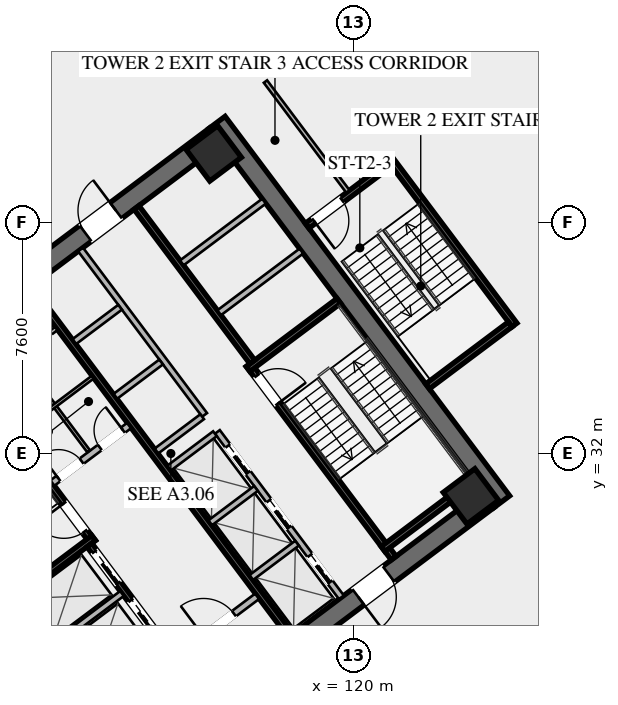
"""IFC4 building model, lengths in metres.
Left out: names, types, materials, properties, quantities, classifications, styles, units other than length and angle.
Written with IfcOpenShell. Run it as: python <this file> out.ifc"""

import sys

from ifc_helpers import new_model, si_unit, direction, frame, frame_2d, origin, origin_2d, place, context, subcontext, project, spatial, rectangle, hollow_rectangle, extrude, element, fill, save


model = new_model("IFC4")
c1 = context("Model", 3, precision=1e-05, world=origin(), true_north=direction((0.0, 1.0)))
c2 = subcontext(c1, "Body", "Model", "MODEL_VIEW")
j1 = project(units=[si_unit("LENGTHUNIT", "METRE"), si_unit("PLANEANGLEUNIT", "RADIAN")], contexts=[c1])
p1 = place(None, origin())
s1 = spatial("IfcSite", under=j1, at=p1, CompositionType="ELEMENT")
p2 = place(p1, origin())
s2 = spatial("IfcBuilding", under=s1, at=p2, CompositionType="ELEMENT")
p3 = place(p2, frame((0.0, 0.0, 15.6)))
s3 = spatial("IfcBuildingStorey", under=s2, at=p3, CompositionType="ELEMENT", Elevation=15.6)
for number, where, z_axis, x_axis in (
    (1, (112.476, 21.107, 0.0), (0.0, 0.0, 1.0), (-0.6, 0.8, 0.0)),
    (2, (115.524, 42.893, 0.0), (0.0, 0.0, 1.0), (0.6, -0.8, 0.0)),
):
    element("IfcWall", number, at=place(p3, frame(where, z_axis=z_axis, x_axis=x_axis)), inside=s3, PredefinedType="SHEAR", context=c2, shape_type="SweptSolid", body=[
        extrude(rectangle(XDim=15.6, YDim=0.65, at=frame_2d((7.8, 0.0))), origin(), (0.0, 0.0, 1.0), 4.2),
    ])
p4 = place(p3, frame((124.429, 30.478, 0.0), z_axis=(0.0, 0.0, 1.0), x_axis=(-0.799998028465, -0.600002628705, 0.0)))
e3 = element("IfcWall", 3, at=p4, inside=s3, PredefinedType="SHEAR", context=c2, shape_type="SweptSolid", body=[
    extrude(rectangle(XDim=14.86, YDim=0.65, at=frame_2d((7.43, 0.0))), origin(), (0.0, 0.0, 1.0), 4.2),
])
p5 = place(p4, frame((9.13, 0.0, 0.0)))
e4 = element("IfcOpeningElement", 4, at=p5, cuts=e3, PredefinedType="OPENING", context=c2, shape_type="SweptSolid", body=[
    extrude(rectangle(XDim=1.25, YDim=2.25, at=frame_2d((0.625, 1.125))), frame((0.0, 0.335, 0.0), z_axis=(0.0, -1.0, 0.0), x_axis=(1.0, 0.0, 0.0)), (0.0, 0.0, 1.0), 0.67),
])
p6 = place(p4, frame((4.08, 0.0, 0.0)))
e5 = element("IfcOpeningElement", 5, at=p6, cuts=e3, PredefinedType="OPENING", context=c2, shape_type="SweptSolid", body=[
    extrude(rectangle(XDim=1.25, YDim=2.25, at=frame_2d((0.625, 1.125))), frame((0.0, 0.335, 0.0), z_axis=(0.0, -1.0, 0.0), x_axis=(1.0, 0.0, 0.0)), (0.0, 0.0, 1.0), 0.67),
])
p7 = place(p3, frame((103.571, 33.522, 0.0), z_axis=(0.0, 0.0, 1.0), x_axis=(0.799998028465, 0.600002628705, 0.0)))
e6 = element("IfcWall", 6, at=p7, inside=s3, PredefinedType="SHEAR", context=c2, shape_type="SweptSolid", body=[
    extrude(rectangle(XDim=14.86, YDim=0.65, at=frame_2d((7.43, 0.0))), origin(), (0.0, 0.0, 1.0), 4.2),
])
p8 = place(p7, frame((4.48, 0.0, 0.0)))
e7 = element("IfcOpeningElement", 7, at=p8, cuts=e6, PredefinedType="OPENING", context=c2, shape_type="SweptSolid", body=[
    extrude(rectangle(XDim=1.25, YDim=2.25, at=frame_2d((0.625, 1.125))), frame((0.0, 0.335, 0.0), z_axis=(0.0, -1.0, 0.0), x_axis=(1.0, 0.0, 0.0)), (0.0, 0.0, 1.0), 0.67),
])
p9 = place(p7, frame((9.53, 0.0, 0.0)))
e8 = element("IfcOpeningElement", 8, at=p9, cuts=e6, PredefinedType="OPENING", context=c2, shape_type="SweptSolid", body=[
    extrude(rectangle(XDim=1.25, YDim=2.25, at=frame_2d((0.625, 1.125))), frame((0.0, 0.335, 0.0), z_axis=(0.0, -1.0, 0.0), x_axis=(1.0, 0.0, 0.0)), (0.0, 0.0, 1.0), 0.67),
])
for number, where, z_axis, x_axis in (
    (9, (123.87, 30.59, 0.0), (0.0, 0.0, 1.0), (0.8, 0.6, 0.0)),
    (10, (115.41, 41.87, 0.0), (0.0, 0.0, 1.0), (0.8, 0.6, 0.0)),
):
    element("IfcColumn", number, at=place(p3, frame(where, z_axis=z_axis, x_axis=x_axis)), inside=s3, PredefinedType="COLUMN", context=c2, shape_type="SweptSolid", body=[
        extrude(hollow_rectangle(XDim=1.3, YDim=1.3, WallThickness=0.05, at=origin_2d()), origin(), (0.0, 0.0, 1.0), 3.9),
    ])
p10 = place(p3, frame((111.44, 29.08, 0.0), z_axis=(0.0, 0.0, 1.0), x_axis=(-0.600009827119, 0.799992629566, 0.0)))
e11 = element("IfcWall", 11, at=p10, inside=s3, PredefinedType="SHEAR", context=c2, shape_type="SweptSolid", body=[
    extrude(rectangle(XDim=7.95, YDim=0.2, at=frame_2d((3.975, 0.0))), origin(), (0.0, 0.0, 1.0), 3.9),
])
p11 = place(p10, frame((0.45, 0.0, 0.0)))
e12 = element("IfcOpeningElement", 12, at=p11, cuts=e11, PredefinedType="OPENING", context=c2, shape_type="SweptSolid", body=[
    extrude(rectangle(XDim=1.15, YDim=2.2, at=frame_2d((0.575, 1.1))), frame((0.0, 0.11, 0.0), z_axis=(0.0, -1.0, 0.0), x_axis=(1.0, 0.0, 0.0)), (0.0, 0.0, 1.0), 0.22),
])
p12 = place(p3, frame((108.476, 26.982, 0.0), z_axis=(0.0, 0.0, 1.0), x_axis=(0.799984290658, 0.600020945218, 0.0)))
e13 = element("IfcWall", 13, at=p12, inside=s3, PredefinedType="SHEAR", context=c2, shape_type="SweptSolid", body=[
    extrude(rectangle(XDim=3.73, YDim=0.2, at=frame_2d((1.865, 0.0))), origin(), (0.0, 0.0, 1.0), 3.9),
])
p13 = place(p3, frame((116.56, 34.92, 0.0), z_axis=(0.0, 0.0, 1.0), x_axis=(0.600009827119, -0.799992629566, 0.0)))
e14 = element("IfcWall", 14, at=p13, inside=s3, PredefinedType="SHEAR", context=c2, shape_type="SweptSolid", body=[
    extrude(rectangle(XDim=7.95, YDim=0.2, at=frame_2d((3.975, 0.0))), origin(), (0.0, 0.0, 1.0), 3.9),
])
p14 = place(p13, frame((0.45, 0.0, 0.0)))
e15 = element("IfcOpeningElement", 15, at=p14, cuts=e14, PredefinedType="OPENING", context=c2, shape_type="SweptSolid", body=[
    extrude(rectangle(XDim=1.15, YDim=2.2, at=frame_2d((0.575, 1.1))), frame((0.0, 0.11, 0.0), z_axis=(0.0, -1.0, 0.0), x_axis=(1.0, 0.0, 0.0)), (0.0, 0.0, 1.0), 0.22),
])
for number, where, z_axis, x_axis in (
    (16, (116.54, 34.78, 0.0), (0.0, 0.0, 1.0), (0.8, 0.6, 0.0)),
    (17, (120.98, 28.86, 0.0), (0.0, 0.0, 1.0), (0.8, 0.6, 0.0)),
):
    element("IfcWall", number, at=place(p3, frame(where, z_axis=z_axis, x_axis=x_axis)), inside=s3, PredefinedType="SHEAR", context=c2, shape_type="SweptSolid", body=[
        extrude(rectangle(XDim=3.73, YDim=0.2, at=frame_2d((1.865, 0.0))), origin(), (0.0, 0.0, 1.0), 3.9),
    ])
p15 = place(p3, frame((117.938, 26.016, 0.0), z_axis=(0.0, 0.0, 1.0), x_axis=(-0.600005463273, 0.799995902516, 0.0)))
e18 = element("IfcWall", 18, at=p15, inside=s3, PredefinedType="SHEAR", context=c2, shape_type="SweptSolid", body=[
    extrude(rectangle(XDim=14.3, YDim=0.2, at=frame_2d((7.15, 0.0))), origin(), (0.0, 0.0, 1.0), 3.9),
])
p16 = place(p3, frame((110.104, 31.028, 0.0), z_axis=(0.0, 0.0, 1.0), x_axis=(0.800018601094, 0.59997519774, 0.0)))
e19 = element("IfcWall", 19, at=p16, inside=s3, PredefinedType="SOLIDWALL", context=c2, shape_type="SweptSolid", body=[
    extrude(rectangle(XDim=3.15, YDim=0.22, at=frame_2d((1.575, 0.0))), origin(), (0.0, 0.0, 1.0), 2.943),
])
p17 = place(p16, frame((0.25, 0.0, 0.0)))
e20 = element("IfcOpeningElement", 20, at=p17, cuts=e19, PredefinedType="OPENING", context=c2, shape_type="SweptSolid", body=[
    extrude(rectangle(XDim=0.95, YDim=2.05, at=frame_2d((0.475, 1.025))), frame((0.0, 0.12, 0.0), z_axis=(0.0, -1.0, 0.0), x_axis=(1.0, 0.0, 0.0)), (0.0, 0.0, 1.0), 0.24),
])
p18 = place(p16, frame((1.95, 0.0, 0.0)))
e21 = element("IfcOpeningElement", 21, at=p18, cuts=e19, PredefinedType="OPENING", context=c2, shape_type="SweptSolid", body=[
    extrude(rectangle(XDim=0.95, YDim=2.05, at=frame_2d((0.475, 1.025))), frame((0.0, 0.12, 0.0), z_axis=(0.0, -1.0, 0.0), x_axis=(1.0, 0.0, 0.0)), (0.0, 0.0, 1.0), 0.24),
])
p19 = place(p3, frame((114.316, 25.412, 0.0), z_axis=(0.0, 0.0, 1.0), x_axis=(0.800018601094, 0.59997519774, 0.0)))
e22 = element("IfcWall", 22, at=p19, inside=s3, PredefinedType="SOLIDWALL", context=c2, shape_type="SweptSolid", body=[
    extrude(rectangle(XDim=3.15, YDim=0.22, at=frame_2d((1.575, 0.0))), origin(), (0.0, 0.0, 1.0), 2.943),
])
p20 = place(p19, frame((0.95, 0.0, 0.0)))
e23 = element("IfcOpeningElement", 23, at=p20, cuts=e22, PredefinedType="OPENING", context=c2, shape_type="SweptSolid", body=[
    extrude(rectangle(XDim=1.25, YDim=2.25, at=frame_2d((0.625, 1.125))), frame((0.0, 0.12, 0.0), z_axis=(0.0, -1.0, 0.0), x_axis=(1.0, 0.0, 0.0)), (0.0, 0.0, 1.0), 0.24),
])
p21 = place(p3, frame((115.13, 23.91, 0.0), z_axis=(0.0, 0.0, 1.0), x_axis=(-0.599975393228, 0.800018454488, 0.0)))
e24 = element("IfcWall", 24, at=p21, inside=s3, PredefinedType="SHEAR", context=c2, shape_type="SweptSolid", body=[
    extrude(rectangle(XDim=6.35, YDim=0.2, at=frame_2d((3.175, 0.0))), origin(), (0.0, 0.0, 1.0), 3.9),
])
p22 = place(p21, frame((4.775, 0.0, 0.0)))
e25 = element("IfcOpeningElement", 25, at=p22, cuts=e24, PredefinedType="OPENING", context=c2, shape_type="SweptSolid", body=[
    extrude(rectangle(XDim=1.3, YDim=2.25, at=frame_2d((0.65, 1.125))), frame((0.0, 0.11, 0.0), z_axis=(0.0, -1.0, 0.0), x_axis=(1.0, 0.0, 0.0)), (0.0, 0.0, 1.0), 0.22),
])
p23 = place(p21, frame((2.775, 0.0, 0.0)))
e26 = element("IfcOpeningElement", 26, at=p23, cuts=e24, PredefinedType="OPENING", context=c2, shape_type="SweptSolid", body=[
    extrude(rectangle(XDim=1.3, YDim=2.25, at=frame_2d((0.65, 1.125))), frame((0.0, 0.11, 0.0), z_axis=(0.0, -1.0, 0.0), x_axis=(1.0, 0.0, 0.0)), (0.0, 0.0, 1.0), 0.22),
])
p24 = place(p21, frame((0.575, 0.0, 0.0)))
e27 = element("IfcOpeningElement", 27, at=p24, cuts=e24, PredefinedType="OPENING", context=c2, shape_type="SweptSolid", body=[
    extrude(rectangle(XDim=1.3, YDim=2.25, at=frame_2d((0.65, 1.125))), frame((0.0, 0.11, 0.0), z_axis=(0.0, -1.0, 0.0), x_axis=(1.0, 0.0, 0.0)), (0.0, 0.0, 1.0), 0.22),
])
p25 = place(p3, frame((109.688, 25.366, 0.0), z_axis=(0.0, 0.0, 1.0), x_axis=(0.8, 0.6, 0.0)))
e28 = element("IfcWall", 28, at=p25, inside=s3, PredefinedType="SOLIDWALL", context=c2, shape_type="SweptSolid", body=[
    extrude(rectangle(XDim=3.38, YDim=0.2, at=frame_2d((1.69, 0.0))), origin(), (0.0, 0.0, 1.0), 3.9),
])
p26 = place(p3, frame((112.87, 40.09, 0.0), z_axis=(0.0, 0.0, 1.0), x_axis=(0.599975393228, -0.800018454488, 0.0)))
e29 = element("IfcWall", 29, at=p26, inside=s3, PredefinedType="SHEAR", context=c2, shape_type="SweptSolid", body=[
    extrude(rectangle(XDim=6.35, YDim=0.2, at=frame_2d((3.175, 0.0))), origin(), (0.0, 0.0, 1.0), 3.9),
])
for number, where, z_axis, x_axis in (
    (30, (115.59, 36.63, 0.0), (0.0, 0.0, 1.0), (0.8, 0.6, 0.0)),
    (31, (114.36, 38.27, 0.0), (0.0, 0.0, 1.0), (0.8, 0.6, 0.0)),
):
    element("IfcWall", number, at=place(p3, frame(where, z_axis=z_axis, x_axis=x_axis)), inside=s3, PredefinedType="SOLIDWALL", context=c2, shape_type="SweptSolid", body=[
        extrude(rectangle(XDim=3.38, YDim=0.2, at=frame_2d((1.69, 0.0))), origin(), (0.0, 0.0, 1.0), 3.9),
    ])
p27 = place(p3, frame((107.71, 34.22, 0.0), z_axis=(0.0, 0.0, 1.0), x_axis=(0.799981399002, 0.60002480053, 0.0)))
e32 = element("IfcWall", 32, at=p27, inside=s3, PredefinedType="PARTITIONING", context=c2, shape_type="SweptSolid", body=[
    extrude(rectangle(XDim=3.15, YDim=0.135, at=frame_2d((1.575, 0.0))), origin(), (0.0, 0.0, 1.0), 2.943),
])
p28 = place(p27, frame((0.25, 0.0, 0.0)))
e33 = element("IfcOpeningElement", 33, at=p28, cuts=e32, PredefinedType="OPENING", context=c2, shape_type="SweptSolid", body=[
    extrude(rectangle(XDim=0.95, YDim=2.05, at=frame_2d((0.475, 1.025))), frame((0.0, 0.077, 0.0), z_axis=(0.0, -1.0, 0.0), x_axis=(1.0, 0.0, 0.0)), (0.0, 0.0, 1.0), 0.155),
])
p29 = place(p27, frame((1.95, 0.0, 0.0)))
e34 = element("IfcOpeningElement", 34, at=p29, cuts=e32, PredefinedType="OPENING", context=c2, shape_type="SweptSolid", body=[
    extrude(rectangle(XDim=0.95, YDim=2.05, at=frame_2d((0.475, 1.025))), frame((0.0, 0.077, 0.0), z_axis=(0.0, -1.0, 0.0), x_axis=(1.0, 0.0, 0.0)), (0.0, 0.0, 1.0), 0.155),
])
p30 = place(p3, frame((111.296, 32.072, 0.0), z_axis=(0.0, 0.0, 1.0), x_axis=(-0.59995887973, 0.800030838552, 0.0)))
e35 = element("IfcWall", 35, at=p30, inside=s3, PredefinedType="PARTITIONING", context=c2, shape_type="SweptSolid", body=[
    extrude(rectangle(XDim=3.8, YDim=0.11, at=frame_2d((1.9, 0.0))), origin(), (0.0, 0.0, 1.0), 2.943),
])
p31 = place(p3, frame((108.91, 32.62, 0.0), z_axis=(0.0, 0.0, 1.0), x_axis=(0.800018601094, 0.59997519774, 0.0)))
e36 = element("IfcWall", 36, at=p31, inside=s3, PredefinedType="PARTITIONING", context=c2, shape_type="SweptSolid", body=[
    extrude(rectangle(XDim=3.15, YDim=0.11, at=frame_2d((1.575, 0.0))), origin(), (0.0, 0.0, 1.0), 2.943),
])
p32 = place(p3, frame((119.61, 27.27, 0.0), z_axis=(0.0, 0.0, 1.0), x_axis=(-0.600011488909, 0.79999138319, 0.0)))
e37 = element("IfcWall", 37, at=p32, inside=s3, PredefinedType="SOLIDWALL", context=c2, shape_type="SweptSolid", body=[
    extrude(rectangle(XDim=6.8, YDim=0.2, at=frame_2d((3.4, 0.0))), origin(), (0.0, 0.0, 1.0), 3.9),
])
p33 = place(p32, frame((0.625, 0.0, 0.0)))
e38 = element("IfcOpeningElement", 38, at=p33, cuts=e37, PredefinedType="OPENING", context=c2, shape_type="SweptSolid", body=[
    extrude(rectangle(XDim=1.1, YDim=2.2, at=frame_2d((0.55, 1.1))), frame((0.0, 0.11, 0.0), z_axis=(0.0, -1.0, 0.0), x_axis=(1.0, 0.0, 0.0)), (0.0, 0.0, 1.0), 0.22),
])
p34 = place(p32, frame((2.875, 0.0, 0.0)))
e39 = element("IfcOpeningElement", 39, at=p34, cuts=e37, PredefinedType="OPENING", context=c2, shape_type="SweptSolid", body=[
    extrude(rectangle(XDim=1.1, YDim=2.2, at=frame_2d((0.55, 1.1))), frame((0.0, 0.11, 0.0), z_axis=(0.0, -1.0, 0.0), x_axis=(1.0, 0.0, 0.0)), (0.0, 0.0, 1.0), 0.22),
])
p35 = place(p32, frame((5.125, 0.0, 0.0)))
e40 = element("IfcOpeningElement", 40, at=p35, cuts=e37, PredefinedType="OPENING", context=c2, shape_type="SweptSolid", body=[
    extrude(rectangle(XDim=1.1, YDim=2.2, at=frame_2d((0.55, 1.1))), frame((0.0, 0.11, 0.0), z_axis=(0.0, -1.0, 0.0), x_axis=(1.0, 0.0, 0.0)), (0.0, 0.0, 1.0), 0.22),
])
p36 = place(p3, frame((116.646, 27.922, 0.0), z_axis=(0.0, 0.0, 1.0), x_axis=(0.8, 0.6, 0.0)))
e41 = element("IfcWall", 41, at=p36, inside=s3, PredefinedType="SOLIDWALL", context=c2, shape_type="SweptSolid", body=[
    extrude(rectangle(XDim=1.88, YDim=0.2, at=frame_2d((0.94, 0.0))), origin(), (0.0, 0.0, 1.0), 3.9),
])
p37 = place(p3, frame((115.296, 29.722, 0.0), z_axis=(0.0, 0.0, 1.0), x_axis=(0.799984418148, 0.600020775241, 0.0)))
e42 = element("IfcWall", 42, at=p37, inside=s3, PredefinedType="SOLIDWALL", context=c2, shape_type="SweptSolid", body=[
    extrude(rectangle(XDim=1.88, YDim=0.2, at=frame_2d((0.94, 0.0))), origin(), (0.0, 0.0, 1.0), 3.9),
])
p38 = place(p3, frame((113.946, 31.522, 0.0), z_axis=(0.0, 0.0, 1.0), x_axis=(0.8, 0.6, 0.0)))
e43 = element("IfcWall", 43, at=p38, inside=s3, PredefinedType="SOLIDWALL", context=c2, shape_type="SweptSolid", body=[
    extrude(rectangle(XDim=1.88, YDim=0.2, at=frame_2d((0.94, 0.0))), origin(), (0.0, 0.0, 1.0), 3.9),
])
p39 = place(p3, frame((115.11, 33.27, 0.0), z_axis=(0.0, 0.0, 1.0), x_axis=(-0.600011488909, 0.79999138319, 0.0)))
e44 = element("IfcWall", 44, at=p39, inside=s3, PredefinedType="SOLIDWALL", context=c2, shape_type="SweptSolid", body=[
    extrude(rectangle(XDim=6.8, YDim=0.2, at=frame_2d((3.4, 0.0))), origin(), (0.0, 0.0, 1.0), 3.9),
])
p40 = place(p3, frame((113.526, 32.082, 0.0), z_axis=(0.0, 0.0, 1.0), x_axis=(0.800046745961, 0.599937666993, 0.0)))
e45 = element("IfcWall", 45, at=p40, inside=s3, PredefinedType="SOLIDWALL", context=c2, shape_type="SweptSolid", body=[
    extrude(rectangle(XDim=1.88, YDim=0.2, at=frame_2d((0.94, 0.0))), origin(), (0.0, 0.0, 1.0), 3.9),
])
p41 = place(p3, frame((112.176, 33.882, 0.0), z_axis=(0.0, 0.0, 1.0), x_axis=(0.8, 0.6, 0.0)))
e46 = element("IfcWall", 46, at=p41, inside=s3, PredefinedType="SOLIDWALL", context=c2, shape_type="SweptSolid", body=[
    extrude(rectangle(XDim=1.88, YDim=0.2, at=frame_2d((0.94, 0.0))), origin(), (0.0, 0.0, 1.0), 3.9),
])
p42 = place(p3, frame((110.826, 35.682, 0.0), z_axis=(0.0, 0.0, 1.0), x_axis=(0.799984418148, 0.600020775241, 0.0)))
e47 = element("IfcWall", 47, at=p42, inside=s3, PredefinedType="SOLIDWALL", context=c2, shape_type="SweptSolid", body=[
    extrude(rectangle(XDim=1.88, YDim=0.2, at=frame_2d((0.94, 0.0))), origin(), (0.0, 0.0, 1.0), 3.9),
])
p43 = place(p3, frame((125.304, 36.228, 0.0), z_axis=(0.0, 0.0, 1.0), x_axis=(-0.59998851072, 0.800008616831, 0.0)))
e48 = element("IfcWall", 48, at=p43, inside=s3, PredefinedType="SHEAR", context=c2, shape_type="SweptSolid", body=[
    extrude(rectangle(XDim=6.8, YDim=0.2, at=frame_2d((3.4, 0.0))), origin(), (0.0, 0.0, 1.0), 3.9),
])
p44 = place(p3, frame((121.204, 41.528, 0.0), z_axis=(0.0, 0.0, 1.0), x_axis=(-0.800017232136, -0.599977023131, 0.0)))
e49 = element("IfcWall", 49, at=p44, inside=s3, PredefinedType="SHEAR", context=c2, shape_type="SweptSolid", body=[
    extrude(rectangle(XDim=3.4, YDim=0.2, at=frame_2d((1.7, 0.0))), origin(), (0.0, 0.0, 1.0), 3.9),
])
p45 = place(p44, frame((1.975, 0.0, 0.0)))
e50 = element("IfcOpeningElement", 50, at=p45, cuts=e49, PredefinedType="OPENING", context=c2, shape_type="SweptSolid", body=[
    extrude(rectangle(XDim=1.15, YDim=2.2, at=frame_2d((0.575, 1.1))), frame((0.0, 0.11, 0.0), z_axis=(0.0, -1.0, 0.0), x_axis=(1.0, 0.0, 0.0)), (0.0, 0.0, 1.0), 0.22),
])
p46 = place(p3, frame((122.444, 34.208, 0.0), z_axis=(0.0, 0.0, 1.0), x_axis=(0.79999138319, 0.600011488909, 0.0)))
e51 = element("IfcWall", 51, at=p46, inside=s3, PredefinedType="SHEAR", context=c2, shape_type="SweptSolid", body=[
    extrude(rectangle(XDim=3.4, YDim=0.2, at=frame_2d((1.7, 0.0))), origin(), (0.0, 0.0, 1.0), 3.9),
])
p47 = place(p3, frame((119.824, 40.618, 0.0), z_axis=(0.0, 0.0, 1.0), x_axis=(-0.59999135767, 0.800006481675, 0.0)))
e52 = element("IfcWall", 52, at=p47, inside=s3, PredefinedType="PARTITIONING", context=c2, shape_type="SweptSolid", body=[
    extrude(rectangle(XDim=4.52, YDim=0.135, at=frame_2d((2.26, 0.0))), origin(), (0.0, 0.0, 1.0), 2.943),
])
p48 = place(p9, origin())
e53 = element("IfcDoor", 53, at=p48, inside=s3, OperationType="SINGLE_SWING_RIGHT", PredefinedType="DOOR", context=c2, shape_type="SweptSolid", body=[
    extrude(rectangle(XDim=1.25, YDim=2.25, at=frame_2d((0.625, 1.125))), frame((0.0, 0.025, 0.0), z_axis=(0.0, -1.0, 0.0), x_axis=(1.0, 0.0, 0.0)), (0.0, 0.0, 1.0), 0.05),
])
fill(e8, e53)
p49 = place(p6, origin())
e54 = element("IfcDoor", 54, at=p49, inside=s3, OperationType="SINGLE_SWING_RIGHT", PredefinedType="DOOR", context=c2, shape_type="SweptSolid", body=[
    extrude(rectangle(XDim=1.25, YDim=2.25, at=frame_2d((0.625, 1.125))), frame((0.0, 0.025, 0.0), z_axis=(0.0, -1.0, 0.0), x_axis=(1.0, 0.0, 0.0)), (0.0, 0.0, 1.0), 0.05),
])
fill(e5, e54)
p50 = place(p11, origin())
e55 = element("IfcDoor", 55, at=p50, inside=s3, OperationType="SINGLE_SWING_RIGHT", PredefinedType="DOOR", context=c2, shape_type="SweptSolid", body=[
    extrude(rectangle(XDim=1.15, YDim=2.2, at=frame_2d((0.575, 1.1))), frame((0.0, 0.025, 0.0), z_axis=(0.0, -1.0, 0.0), x_axis=(1.0, 0.0, 0.0)), (0.0, 0.0, 1.0), 0.05),
])
fill(e12, e55)
p51 = place(p14, origin())
e56 = element("IfcDoor", 56, at=p51, inside=s3, OperationType="SINGLE_SWING_RIGHT", PredefinedType="DOOR", context=c2, shape_type="SweptSolid", body=[
    extrude(rectangle(XDim=1.15, YDim=2.2, at=frame_2d((0.575, 1.1))), frame((0.0, 0.025, 0.0), z_axis=(0.0, -1.0, 0.0), x_axis=(1.0, 0.0, 0.0)), (0.0, 0.0, 1.0), 0.05),
])
fill(e15, e56)
p52 = place(p20, origin())
e57 = element("IfcDoor", 57, at=p52, inside=s3, OperationType="SINGLE_SWING_LEFT", PredefinedType="DOOR", context=c2, shape_type="SweptSolid", body=[
    extrude(rectangle(XDim=1.25, YDim=2.25, at=frame_2d((0.625, 1.125))), frame((0.0, 0.025, 0.0), z_axis=(0.0, -1.0, 0.0), x_axis=(1.0, 0.0, 0.0)), (0.0, 0.0, 1.0), 0.05),
])
fill(e23, e57)
p53 = place(p17, origin())
e58 = element("IfcDoor", 58, at=p53, inside=s3, OperationType="SINGLE_SWING_LEFT", PredefinedType="DOOR", context=c2, shape_type="SweptSolid", body=[
    extrude(rectangle(XDim=0.95, YDim=2.05, at=frame_2d((0.475, 1.025))), frame((0.0, 0.025, 0.0), z_axis=(0.0, -1.0, 0.0), x_axis=(1.0, 0.0, 0.0)), (0.0, 0.0, 1.0), 0.05),
])
fill(e20, e58)
p54 = place(p18, origin())
e59 = element("IfcDoor", 59, at=p54, inside=s3, OperationType="SINGLE_SWING_RIGHT", PredefinedType="DOOR", context=c2, shape_type="SweptSolid", body=[
    extrude(rectangle(XDim=0.95, YDim=2.05, at=frame_2d((0.475, 1.025))), frame((0.0, 0.025, 0.0), z_axis=(0.0, -1.0, 0.0), x_axis=(1.0, 0.0, 0.0)), (0.0, 0.0, 1.0), 0.05),
])
fill(e21, e59)
p55 = place(p45, origin())
e60 = element("IfcDoor", 60, at=p55, inside=s3, OperationType="SINGLE_SWING_RIGHT", PredefinedType="DOOR", context=c2, shape_type="SweptSolid", body=[
    extrude(rectangle(XDim=1.15, YDim=2.2, at=frame_2d((0.575, 1.1))), frame((0.0, 0.025, 0.0), z_axis=(0.0, -1.0, 0.0), x_axis=(1.0, 0.0, 0.0)), (0.0, 0.0, 1.0), 0.05),
])
fill(e50, e60)
p56 = place(p22, origin())
e61 = element("IfcDoor", 61, at=p56, inside=s3, OperationType="SLIDING_TO_LEFT", PredefinedType="DOOR", context=c2, shape_type="SweptSolid", body=[
    extrude(rectangle(XDim=1.3, YDim=2.25, at=frame_2d((0.65, 1.125))), frame((0.0, 0.025, 0.0), z_axis=(0.0, -1.0, 0.0), x_axis=(1.0, 0.0, 0.0)), (0.0, 0.0, 1.0), 0.05),
])
fill(e25, e61)
p57 = place(p23, origin())
e62 = element("IfcDoor", 62, at=p57, inside=s3, OperationType="SLIDING_TO_LEFT", PredefinedType="DOOR", context=c2, shape_type="SweptSolid", body=[
    extrude(rectangle(XDim=1.3, YDim=2.25, at=frame_2d((0.65, 1.125))), frame((0.0, 0.025, 0.0), z_axis=(0.0, -1.0, 0.0), x_axis=(1.0, 0.0, 0.0)), (0.0, 0.0, 1.0), 0.05),
])
fill(e26, e62)
p58 = place(p33, origin())
e63 = element("IfcDoor", 63, at=p58, inside=s3, OperationType="SLIDING_TO_LEFT", PredefinedType="DOOR", context=c2, shape_type="SweptSolid", body=[
    extrude(rectangle(XDim=1.1, YDim=2.2, at=frame_2d((0.55, 1.1))), frame((0.0, 0.025, 0.0), z_axis=(0.0, -1.0, 0.0), x_axis=(1.0, 0.0, 0.0)), (0.0, 0.0, 1.0), 0.05),
])
fill(e38, e63)
p59 = place(p34, origin())
e64 = element("IfcDoor", 64, at=p59, inside=s3, OperationType="SLIDING_TO_LEFT", PredefinedType="DOOR", context=c2, shape_type="SweptSolid", body=[
    extrude(rectangle(XDim=1.1, YDim=2.2, at=frame_2d((0.55, 1.1))), frame((0.0, 0.025, 0.0), z_axis=(0.0, -1.0, 0.0), x_axis=(1.0, 0.0, 0.0)), (0.0, 0.0, 1.0), 0.05),
])
fill(e39, e64)
p60 = place(p35, origin())
e65 = element("IfcDoor", 65, at=p60, inside=s3, OperationType="SLIDING_TO_LEFT", PredefinedType="DOOR", context=c2, shape_type="SweptSolid", body=[
    extrude(rectangle(XDim=1.1, YDim=2.2, at=frame_2d((0.55, 1.1))), frame((0.0, 0.025, 0.0), z_axis=(0.0, -1.0, 0.0), x_axis=(1.0, 0.0, 0.0)), (0.0, 0.0, 1.0), 0.05),
])
fill(e40, e65)
save(model, sys.argv[1])
